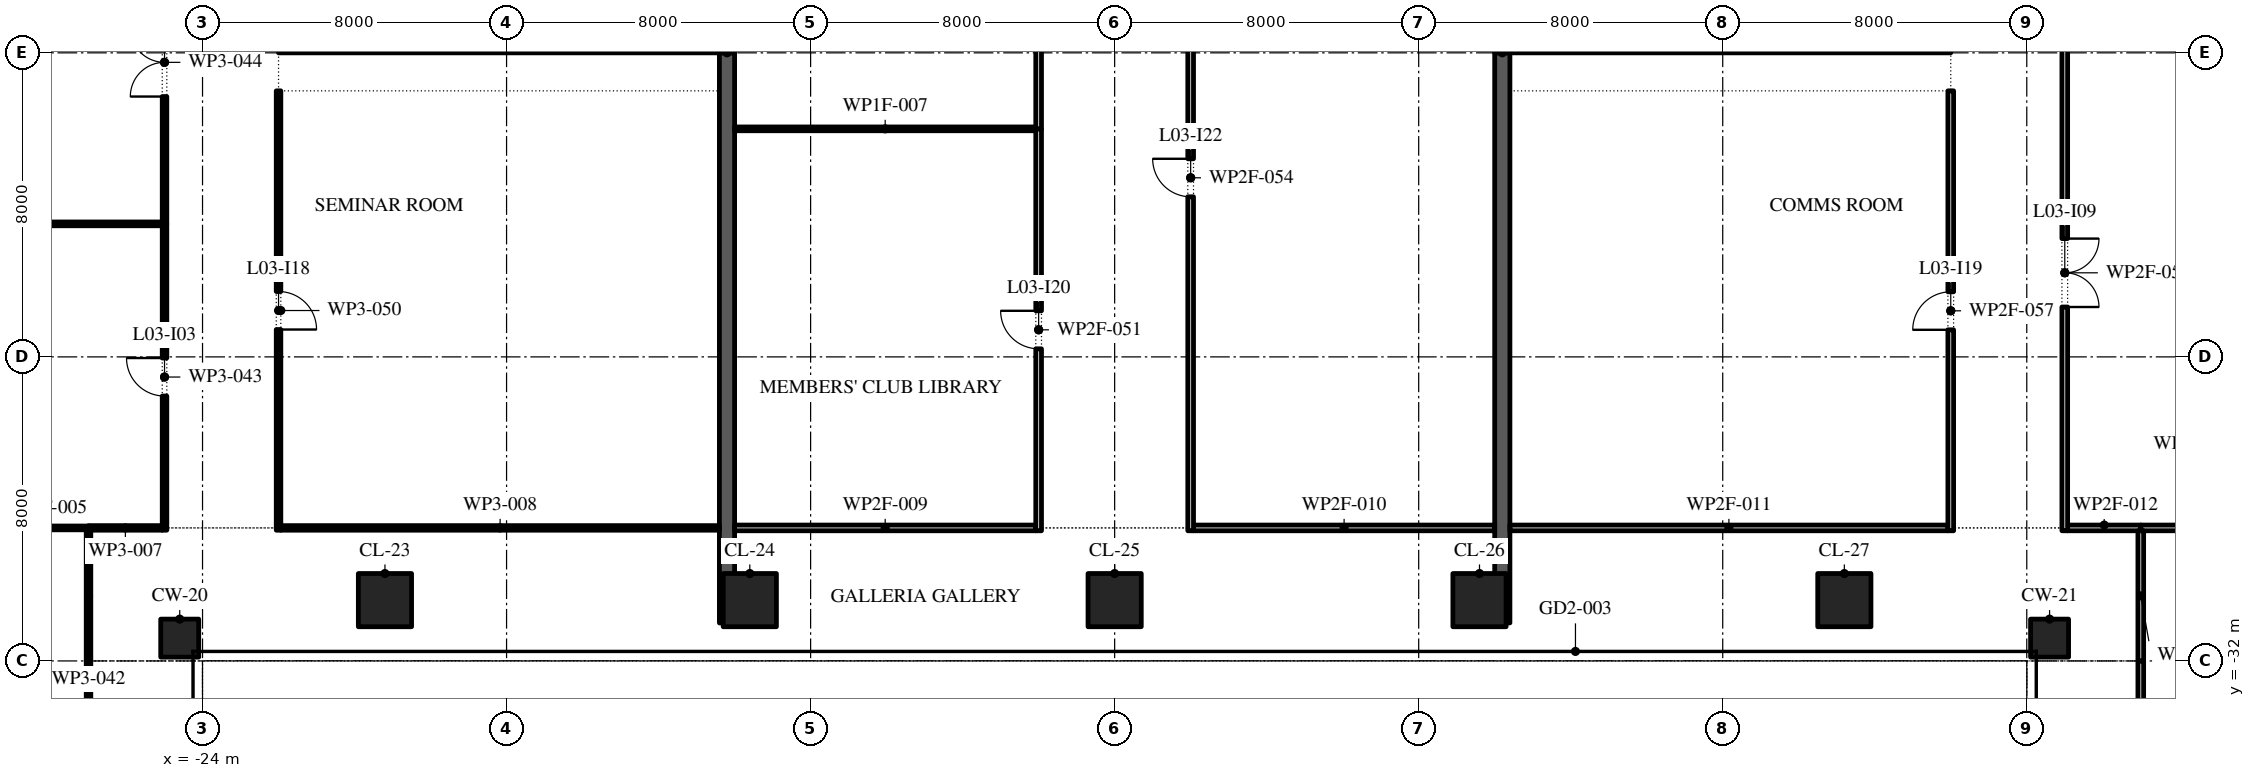
"""IFC4 building model, lengths in metres.
Left out: names, types, materials, properties, quantities, classifications, styles, units other than length and angle.
Written with IfcOpenShell. Run it as: python <this file> out.ifc"""

import sys

from ifc_helpers import new_model, si_unit, direction, frame, frame_2d, origin, origin_2d, place, context, subcontext, project, spatial, rectangle, extrude, element, fill, save


model = new_model("IFC4")
c1 = context("Model", 3, precision=1e-05, world=origin(), true_north=direction((0.0, 1.0)))
c2 = subcontext(c1, "Body", "Model", "MODEL_VIEW")
j1 = project(units=[si_unit("LENGTHUNIT", "METRE"), si_unit("PLANEANGLEUNIT", "RADIAN")], contexts=[c1])
p1 = place(None, origin())
s1 = spatial("IfcSite", under=j1, at=p1, CompositionType="ELEMENT")
p2 = place(p1, origin())
s2 = spatial("IfcBuilding", under=s1, at=p2, CompositionType="ELEMENT")
p3 = place(p2, frame((0.0, 0.0, 19.2)))
s3 = spatial("IfcBuildingStorey", under=s2, at=p3, CompositionType="ELEMENT", Elevation=19.2)
for number, where, z_axis, x_axis in (
    (1, (-24.6, -31.4, 0.0), (0.0, 0.0, 1.0), (1.0, 0.0, 0.0)),
    (2, (24.6, -31.4, 0.0), (0.0, 0.0, 1.0), (1.0, 0.0, 0.0)),
):
    element("IfcColumn", number, at=place(p3, frame(where, z_axis=z_axis, x_axis=x_axis)), inside=s3, PredefinedType="COLUMN", context=c2, shape_type="SweptSolid", body=[
        extrude(rectangle(XDim=1.0, YDim=1.0, at=origin_2d()), origin(), (0.0, 0.0, 1.0), 4.8),
    ])
for number, where, z_axis, x_axis in (
    (3, (-19.2, -30.4, 0.0), (0.0, 0.0, 1.0), (1.0, 0.0, 0.0)),
    (4, (-9.6, -30.4, 0.0), (0.0, 0.0, 1.0), (1.0, 0.0, 0.0)),
    (5, (0.0, -30.4, 0.0), (0.0, 0.0, 1.0), (1.0, 0.0, 0.0)),
    (6, (9.6, -30.4, 0.0), (0.0, 0.0, 1.0), (1.0, 0.0, 0.0)),
    (7, (19.2, -30.4, 0.0), (0.0, 0.0, 1.0), (1.0, 0.0, 0.0)),
):
    element("IfcColumn", number, at=place(p3, frame(where, z_axis=z_axis, x_axis=x_axis)), inside=s3, PredefinedType="COLUMN", context=c2, shape_type="SweptSolid", body=[
        extrude(rectangle(XDim=1.4, YDim=1.4, at=origin_2d()), origin(), (0.0, 0.0, 1.0), 4.8),
    ])
for number, where, z_axis, x_axis in (
    (8, (-10.2, -31.0, 0.0), (0.0, 0.0, 1.0), (0.0, 1.0, 0.0)),
    (9, (10.2, -31.0, 0.0), (0.0, 0.0, 1.0), (0.0, 1.0, 0.0)),
):
    element("IfcWall", number, at=place(p3, frame(where, z_axis=z_axis, x_axis=x_axis)), inside=s3, PredefinedType="SHEAR", context=c2, shape_type="SweptSolid", body=[
        extrude(rectangle(XDim=15.0, YDim=0.4, at=frame_2d((7.5, 0.0))), origin(), (0.0, 0.0, 1.0), 4.5),
    ])
p4 = place(p3, frame((-29.9, -28.5, 0.0), z_axis=(0.0, 0.0, 1.0), x_axis=(1.0, 0.0, 0.0)))
e10 = element("IfcWall", 10, at=p4, inside=s3, PredefinedType="PARTITIONING", context=c2, shape_type="SweptSolid", body=[
    extrude(rectangle(XDim=2.9, YDim=0.1, at=frame_2d((1.45, 0.0))), origin(), (0.0, 0.0, 1.0), 4.5),
])
p5 = place(p3, frame((-27.0, -28.5, 0.0), z_axis=(0.0, 0.0, 1.0), x_axis=(1.0, 0.0, 0.0)))
e11 = element("IfcWall", 11, at=p5, inside=s3, PredefinedType="PARTITIONING", context=c2, shape_type="SweptSolid", body=[
    extrude(rectangle(XDim=1.94, YDim=0.12, at=frame_2d((0.97, 0.0))), origin(), (0.0, 0.0, 1.0), 4.5),
])
p6 = place(p3, frame((-21.94, -28.5, 0.0), z_axis=(0.0, 0.0, 1.0), x_axis=(1.0, 0.0, 0.0)))
e12 = element("IfcWall", 12, at=p6, inside=s3, PredefinedType="PARTITIONING", context=c2, shape_type="SweptSolid", body=[
    extrude(rectangle(XDim=11.54, YDim=0.12, at=frame_2d((5.77, 0.0))), origin(), (0.0, 0.0, 1.0), 4.5),
])
for number, where, z_axis, x_axis in (
    (13, (-10.0, -28.5, 0.0), (0.0, 0.0, 1.0), (1.0, 0.0, 0.0)),
    (14, (2.075, -28.5, 0.0), (0.0, 0.0, 1.0), (1.0, 0.0, 0.0)),
):
    element("IfcWall", number, at=place(p3, frame(where, z_axis=z_axis, x_axis=x_axis)), inside=s3, PredefinedType="PARTITIONING", context=c2, shape_type="SweptSolid", body=[
        extrude(rectangle(XDim=7.925, YDim=0.15, at=frame_2d((3.962, 0.0))), origin(), (0.0, 0.0, 1.0), 4.5),
    ])
p7 = place(p3, frame((10.4, -28.5, 0.0), z_axis=(0.0, 0.0, 1.0), x_axis=(1.0, 0.0, 0.0)))
e15 = element("IfcWall", 15, at=p7, inside=s3, PredefinedType="PARTITIONING", context=c2, shape_type="SweptSolid", body=[
    extrude(rectangle(XDim=11.525, YDim=0.15, at=frame_2d((5.763, 0.0))), origin(), (0.0, 0.0, 1.0), 4.5),
])
p8 = place(p3, frame((25.075, -28.5, 0.0), z_axis=(0.0, 0.0, 1.0), x_axis=(1.0, 0.0, 0.0)))
e16 = element("IfcWall", 16, at=p8, inside=s3, PredefinedType="PARTITIONING", context=c2, shape_type="SweptSolid", body=[
    extrude(rectangle(XDim=1.925, YDim=0.15, at=frame_2d((0.962, 0.0))), origin(), (0.0, 0.0, 1.0), 4.5),
])
p9 = place(p3, frame((27.0, -28.5, 0.0), z_axis=(0.0, 0.0, 1.0), x_axis=(1.0, 0.0, 0.0)))
e17 = element("IfcWall", 17, at=p9, inside=s3, PredefinedType="PARTITIONING", context=c2, shape_type="SweptSolid", body=[
    extrude(rectangle(XDim=2.9, YDim=0.15, at=frame_2d((1.45, 0.0))), origin(), (0.0, 0.0, 1.0), 4.5),
])
p10 = place(p3, frame((-43.5, -20.5, 0.0), z_axis=(0.0, 0.0, 1.0), x_axis=(1.0, 0.0, 0.0)))
e18 = element("IfcWall", 18, at=p10, inside=s3, PredefinedType="PARTITIONING", context=c2, shape_type="SweptSolid", body=[
    extrude(rectangle(XDim=18.44, YDim=0.1, at=frame_2d((9.22, 0.0))), origin(), (0.0, 0.0, 1.0), 4.5),
])
p11 = place(p3, frame((-10.0, -18.0, 0.0), z_axis=(0.0, 0.0, 1.0), x_axis=(1.0, 0.0, 0.0)))
e19 = element("IfcWall", 19, at=p11, inside=s3, PredefinedType="PARTITIONING", context=c2, shape_type="SweptSolid", body=[
    extrude(rectangle(XDim=7.925, YDim=0.1, at=frame_2d((3.962, 0.0))), origin(), (0.0, 0.0, 1.0), 4.5),
])
p12 = place(p3, frame((-27.0, -42.0, 0.0), z_axis=(0.0, 0.0, 1.0), x_axis=(0.0, 1.0, 0.0)))
e20 = element("IfcWall", 20, at=p12, inside=s3, PredefinedType="PARTITIONING", context=c2, shape_type="SweptSolid", body=[
    extrude(rectangle(XDim=10.0, YDim=0.12, at=frame_2d((5.0, 0.0))), origin(), (0.0, 0.0, 1.0), 4.5),
])
p13 = place(p12, frame((4.1, 0.0, 0.0)))
e21 = element("IfcOpeningElement", 21, at=p13, cuts=e20, PredefinedType="OPENING", context=c2, shape_type="SweptSolid", body=[
    extrude(rectangle(XDim=1.8, YDim=2.1, at=frame_2d((0.9, 1.05))), frame((0.0, 0.07, 0.0), z_axis=(0.0, -1.0, 0.0), x_axis=(1.0, 0.0, 0.0)), (0.0, 0.0, 1.0), 0.14),
])
p14 = place(p3, frame((-27.0, -32.0, 0.0), z_axis=(0.0, 0.0, 1.0), x_axis=(0.0, 1.0, 0.0)))
e22 = element("IfcWall", 22, at=p14, inside=s3, PredefinedType="PARTITIONING", context=c2, shape_type="SweptSolid", body=[
    extrude(rectangle(XDim=3.44, YDim=0.12, at=frame_2d((1.72, 0.0))), origin(), (0.0, 0.0, 1.0), 4.5),
])
p15 = place(p3, frame((-25.0, -28.56, 0.0), z_axis=(0.0, 0.0, 1.0), x_axis=(0.0, 1.0, 0.0)))
e23 = element("IfcWall", 23, at=p15, inside=s3, PredefinedType="PARTITIONING", context=c2, shape_type="SweptSolid", body=[
    extrude(rectangle(XDim=8.06, YDim=0.12, at=frame_2d((4.03, 0.0))), origin(), (0.0, 0.0, 1.0), 4.5),
])
p16 = place(p15, frame((3.53, 0.0, 0.0)))
e24 = element("IfcOpeningElement", 24, at=p16, cuts=e23, PredefinedType="OPENING", context=c2, shape_type="SweptSolid", body=[
    extrude(rectangle(XDim=1.0, YDim=2.1, at=frame_2d((0.5, 1.05))), frame((0.0, 0.07, 0.0), z_axis=(0.0, -1.0, 0.0), x_axis=(1.0, 0.0, 0.0)), (0.0, 0.0, 1.0), 0.14),
])
p17 = place(p3, frame((-25.0, -20.5, 0.0), z_axis=(0.0, 0.0, 1.0), x_axis=(0.0, 1.0, 0.0)))
e25 = element("IfcWall", 25, at=p17, inside=s3, PredefinedType="PARTITIONING", context=c2, shape_type="SweptSolid", body=[
    extrude(rectangle(XDim=8.5, YDim=0.12, at=frame_2d((4.25, 0.0))), origin(), (0.0, 0.0, 1.0), 4.5),
])
p18 = place(p17, frame((3.35, 0.0, 0.0)))
e26 = element("IfcOpeningElement", 26, at=p18, cuts=e25, PredefinedType="OPENING", context=c2, shape_type="SweptSolid", body=[
    extrude(rectangle(XDim=1.8, YDim=2.1, at=frame_2d((0.9, 1.05))), frame((0.0, 0.07, 0.0), z_axis=(0.0, -1.0, 0.0), x_axis=(1.0, 0.0, 0.0)), (0.0, 0.0, 1.0), 0.14),
])
p19 = place(p3, frame((-22.0, -28.56, 0.0), z_axis=(0.0, 0.0, 1.0), x_axis=(0.0, 1.0, 0.0)))
e27 = element("IfcWall", 27, at=p19, inside=s3, PredefinedType="PARTITIONING", context=c2, shape_type="SweptSolid", body=[
    extrude(rectangle(XDim=11.56, YDim=0.12, at=frame_2d((5.78, 0.0))), origin(), (0.0, 0.0, 1.0), 4.5),
])
p20 = place(p19, frame((5.28, 0.0, 0.0)))
e28 = element("IfcOpeningElement", 28, at=p20, cuts=e27, PredefinedType="OPENING", context=c2, shape_type="SweptSolid", body=[
    extrude(rectangle(XDim=1.0, YDim=2.1, at=frame_2d((0.5, 1.05))), frame((0.0, 0.07, 0.0), z_axis=(0.0, -1.0, 0.0), x_axis=(1.0, 0.0, 0.0)), (0.0, 0.0, 1.0), 0.14),
])
p21 = place(p3, frame((-2.0, -28.575, 0.0), z_axis=(0.0, 0.0, 1.0), x_axis=(0.0, 1.0, 0.0)))
e29 = element("IfcWall", 29, at=p21, inside=s3, PredefinedType="PARTITIONING", context=c2, shape_type="SweptSolid", body=[
    extrude(rectangle(XDim=10.575, YDim=0.15, at=frame_2d((5.288, 0.0))), origin(), (0.0, 0.0, 1.0), 4.5),
])
p22 = place(p21, frame((4.788, 0.0, 0.0)))
e30 = element("IfcOpeningElement", 30, at=p22, cuts=e29, PredefinedType="OPENING", context=c2, shape_type="SweptSolid", body=[
    extrude(rectangle(XDim=1.0, YDim=2.1, at=frame_2d((0.5, 1.05))), frame((0.0, 0.085, 0.0), z_axis=(0.0, -1.0, 0.0), x_axis=(1.0, 0.0, 0.0)), (0.0, 0.0, 1.0), 0.17),
])
p23 = place(p3, frame((-2.0, -18.0, 0.0), z_axis=(0.0, 0.0, 1.0), x_axis=(0.0, 1.0, 0.0)))
e31 = element("IfcWall", 31, at=p23, inside=s3, PredefinedType="PARTITIONING", context=c2, shape_type="SweptSolid", body=[
    extrude(rectangle(XDim=13.075, YDim=0.15, at=frame_2d((6.538, 0.0))), origin(), (0.0, 0.0, 1.0), 4.5),
])
p24 = place(p23, frame((6.038, 0.0, 0.0)))
e32 = element("IfcOpeningElement", 32, at=p24, cuts=e31, PredefinedType="OPENING", context=c2, shape_type="SweptSolid", body=[
    extrude(rectangle(XDim=1.0, YDim=2.1, at=frame_2d((0.5, 1.05))), frame((0.0, 0.085, 0.0), z_axis=(0.0, -1.0, 0.0), x_axis=(1.0, 0.0, 0.0)), (0.0, 0.0, 1.0), 0.17),
])
p25 = place(p3, frame((2.0, -28.575, 0.0), z_axis=(0.0, 0.0, 1.0), x_axis=(0.0, 1.0, 0.0)))
e33 = element("IfcWall", 33, at=p25, inside=s3, PredefinedType="PARTITIONING", context=c2, shape_type="SweptSolid", body=[
    extrude(rectangle(XDim=18.575, YDim=0.15, at=frame_2d((9.288, 0.0))), origin(), (0.0, 0.0, 1.0), 4.5),
])
p26 = place(p25, frame((8.788, 0.0, 0.0)))
e34 = element("IfcOpeningElement", 34, at=p26, cuts=e33, PredefinedType="OPENING", context=c2, shape_type="SweptSolid", body=[
    extrude(rectangle(XDim=1.0, YDim=2.1, at=frame_2d((0.5, 1.05))), frame((0.0, 0.085, 0.0), z_axis=(0.0, -1.0, 0.0), x_axis=(1.0, 0.0, 0.0)), (0.0, 0.0, 1.0), 0.17),
])
p27 = place(p3, frame((22.0, -28.575, 0.0), z_axis=(0.0, 0.0, 1.0), x_axis=(0.0, 1.0, 0.0)))
e35 = element("IfcWall", 35, at=p27, inside=s3, PredefinedType="PARTITIONING", context=c2, shape_type="SweptSolid", body=[
    extrude(rectangle(XDim=11.575, YDim=0.15, at=frame_2d((5.788, 0.0))), origin(), (0.0, 0.0, 1.0), 4.5),
])
p28 = place(p27, frame((5.288, 0.0, 0.0)))
e36 = element("IfcOpeningElement", 36, at=p28, cuts=e35, PredefinedType="OPENING", context=c2, shape_type="SweptSolid", body=[
    extrude(rectangle(XDim=1.0, YDim=2.1, at=frame_2d((0.5, 1.05))), frame((0.0, 0.085, 0.0), z_axis=(0.0, -1.0, 0.0), x_axis=(1.0, 0.0, 0.0)), (0.0, 0.0, 1.0), 0.17),
])
p29 = place(p3, frame((25.0, -28.575, 0.0), z_axis=(0.0, 0.0, 1.0), x_axis=(0.0, 1.0, 0.0)))
e37 = element("IfcWall", 37, at=p29, inside=s3, PredefinedType="PARTITIONING", context=c2, shape_type="SweptSolid", body=[
    extrude(rectangle(XDim=13.575, YDim=0.15, at=frame_2d((6.788, 0.0))), origin(), (0.0, 0.0, 1.0), 4.5),
])
p30 = place(p29, frame((5.887, 0.0, 0.0)))
e38 = element("IfcOpeningElement", 38, at=p30, cuts=e37, PredefinedType="OPENING", context=c2, shape_type="SweptSolid", body=[
    extrude(rectangle(XDim=1.8, YDim=2.1, at=frame_2d((0.9, 1.05))), frame((0.0, 0.085, 0.0), z_axis=(0.0, -1.0, 0.0), x_axis=(1.0, 0.0, 0.0)), (0.0, 0.0, 1.0), 0.17),
])
p31 = place(p3, frame((27.0, -42.0, 0.0), z_axis=(0.0, 0.0, 1.0), x_axis=(0.0, 1.0, 0.0)))
e39 = element("IfcWall", 39, at=p31, inside=s3, PredefinedType="PARTITIONING", context=c2, shape_type="SweptSolid", body=[
    extrude(rectangle(XDim=10.0, YDim=0.15, at=frame_2d((5.0, 0.0))), origin(), (0.0, 0.0, 1.0), 4.5),
])
p32 = place(p31, frame((4.1, 0.0, 0.0)))
e40 = element("IfcOpeningElement", 40, at=p32, cuts=e39, PredefinedType="OPENING", context=c2, shape_type="SweptSolid", body=[
    extrude(rectangle(XDim=1.8, YDim=2.1, at=frame_2d((0.9, 1.05))), frame((0.0, 0.085, 0.0), z_axis=(0.0, -1.0, 0.0), x_axis=(1.0, 0.0, 0.0)), (0.0, 0.0, 1.0), 0.17),
])
p33 = place(p3, frame((27.0, -32.0, 0.0), z_axis=(0.0, 0.0, 1.0), x_axis=(0.0, 1.0, 0.0)))
e41 = element("IfcWall", 41, at=p33, inside=s3, PredefinedType="PARTITIONING", context=c2, shape_type="SweptSolid", body=[
    extrude(rectangle(XDim=3.425, YDim=0.15, at=frame_2d((1.712, 0.0))), origin(), (0.0, 0.0, 1.0), 4.5),
])
p34 = place(p16, origin())
e42 = element("IfcDoor", 42, at=p34, inside=s3, OperationType="SINGLE_SWING_LEFT", PredefinedType="DOOR", context=c2, shape_type="SweptSolid", body=[
    extrude(rectangle(XDim=1.0, YDim=2.1, at=frame_2d((0.5, 1.05))), frame((0.0, 0.025, 0.0), z_axis=(0.0, -1.0, 0.0), x_axis=(1.0, 0.0, 0.0)), (0.0, 0.0, 1.0), 0.05),
])
fill(e24, e42)
p35 = place(p18, origin())
e43 = element("IfcDoor", 43, at=p35, inside=s3, OperationType="SINGLE_SWING_RIGHT", PredefinedType="DOOR", context=c2, shape_type="SweptSolid", body=[
    extrude(rectangle(XDim=1.8, YDim=2.1, at=frame_2d((0.9, 1.05))), frame((0.0, 0.025, 0.0), z_axis=(0.0, -1.0, 0.0), x_axis=(1.0, 0.0, 0.0)), (0.0, 0.0, 1.0), 0.05),
])
fill(e26, e43)
p36 = place(p30, frame((1.8, 0.0, 0.0), z_axis=(0.0, 0.0, 1.0), x_axis=(-1.0, 0.0, 0.0)))
e44 = element("IfcDoor", 44, at=p36, inside=s3, OperationType="SINGLE_SWING_RIGHT", PredefinedType="DOOR", context=c2, shape_type="SweptSolid", body=[
    extrude(rectangle(XDim=1.8, YDim=2.1, at=frame_2d((0.9, 1.05))), frame((0.0, 0.025, 0.0), z_axis=(0.0, -1.0, 0.0), x_axis=(1.0, 0.0, 0.0)), (0.0, 0.0, 1.0), 0.05),
])
fill(e38, e44)
p37 = place(p20, frame((1.0, 0.0, 0.0), z_axis=(0.0, 0.0, 1.0), x_axis=(-1.0, 0.0, 0.0)))
e45 = element("IfcDoor", 45, at=p37, inside=s3, OperationType="SINGLE_SWING_LEFT", PredefinedType="DOOR", context=c2, shape_type="SweptSolid", body=[
    extrude(rectangle(XDim=1.0, YDim=2.1, at=frame_2d((0.5, 1.05))), frame((0.0, 0.025, 0.0), z_axis=(0.0, -1.0, 0.0), x_axis=(1.0, 0.0, 0.0)), (0.0, 0.0, 1.0), 0.05),
])
fill(e28, e45)
p38 = place(p28, origin())
e46 = element("IfcDoor", 46, at=p38, inside=s3, OperationType="SINGLE_SWING_RIGHT", PredefinedType="DOOR", context=c2, shape_type="SweptSolid", body=[
    extrude(rectangle(XDim=1.0, YDim=2.1, at=frame_2d((0.5, 1.05))), frame((0.0, 0.025, 0.0), z_axis=(0.0, -1.0, 0.0), x_axis=(1.0, 0.0, 0.0)), (0.0, 0.0, 1.0), 0.05),
])
fill(e36, e46)
p39 = place(p22, origin())
e47 = element("IfcDoor", 47, at=p39, inside=s3, OperationType="SINGLE_SWING_LEFT", PredefinedType="DOOR", context=c2, shape_type="SweptSolid", body=[
    extrude(rectangle(XDim=1.0, YDim=2.1, at=frame_2d((0.5, 1.05))), frame((0.0, 0.025, 0.0), z_axis=(0.0, -1.0, 0.0), x_axis=(1.0, 0.0, 0.0)), (0.0, 0.0, 1.0), 0.05),
])
fill(e30, e47)
p40 = place(p26, origin())
e48 = element("IfcDoor", 48, at=p40, inside=s3, OperationType="SINGLE_SWING_LEFT", PredefinedType="DOOR", context=c2, shape_type="SweptSolid", body=[
    extrude(rectangle(XDim=1.0, YDim=2.1, at=frame_2d((0.5, 1.05))), frame((0.0, 0.025, 0.0), z_axis=(0.0, -1.0, 0.0), x_axis=(1.0, 0.0, 0.0)), (0.0, 0.0, 1.0), 0.05),
])
fill(e34, e48)
save(model, sys.argv[1])
